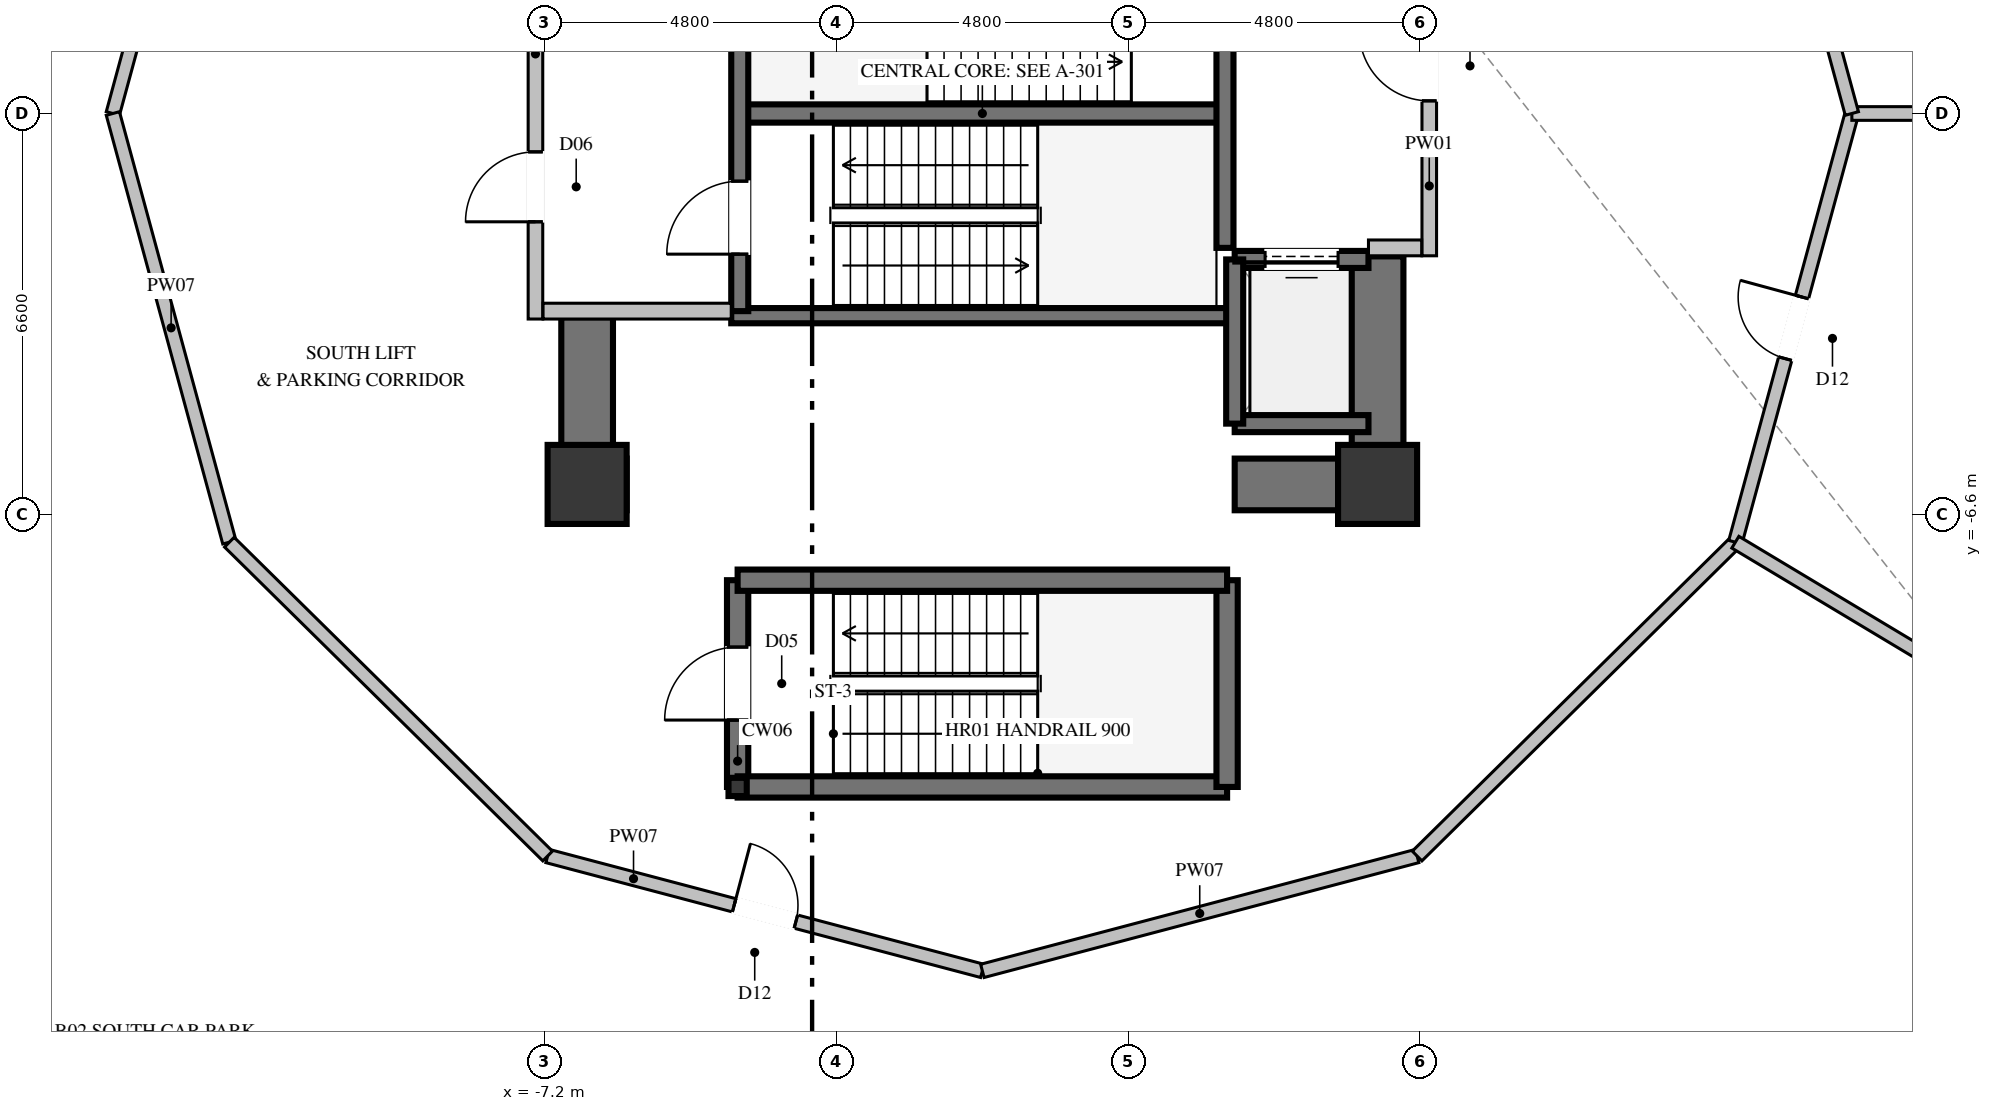
"""IFC4 building model, lengths in metres.
Left out: names, types, materials, properties, quantities, classifications, styles, units other than length and angle.
Written with IfcOpenShell. Run it as: python <this file> out.ifc"""

import sys

from ifc_helpers import new_model, si_unit, direction, frame, frame_2d, origin, origin_2d, place, context, subcontext, project, spatial, rectangle, hollow_rectangle, extrude, element, fill, save


model = new_model("IFC4")
c1 = context("Model", 3, precision=1e-05, world=origin(), true_north=direction((0.0, 1.0)))
c2 = subcontext(c1, "Body", "Model", "MODEL_VIEW")
j1 = project(units=[si_unit("LENGTHUNIT", "METRE"), si_unit("PLANEANGLEUNIT", "RADIAN")], contexts=[c1])
p1 = place(None, origin())
s1 = spatial("IfcSite", under=j1, at=p1, CompositionType="ELEMENT")
p2 = place(p1, origin())
s2 = spatial("IfcBuilding", under=s1, at=p2, CompositionType="ELEMENT")
p3 = place(p2, frame((0.0, 0.0, -9.6)))
s3 = spatial("IfcBuildingStorey", under=s2, at=p3, CompositionType="ELEMENT", Elevation=-9.6)
for number, where, z_axis, x_axis in (
    (1, (-6.5, -6.1, 0.0), (0.0, 0.0, 1.0), (1.0, 0.0, 0.0)),
    (2, (6.5, -6.1, 0.0), (0.0, 0.0, 1.0), (1.0, 0.0, 0.0)),
):
    element("IfcColumn", number, at=place(p3, frame(where, z_axis=z_axis, x_axis=x_axis)), inside=s3, PredefinedType="COLUMN", context=c2, shape_type="SweptSolid", body=[
        extrude(rectangle(XDim=1.3, YDim=1.3, at=origin_2d()), origin(), (0.0, 0.0, 1.0), 4.8),
    ])
p4 = place(p3, frame((-3.99, 0.0, 0.0), z_axis=(0.0, 0.0, 1.0), x_axis=(1.0, 0.0, 0.0)))
e3 = element("IfcWall", 3, at=p4, inside=s3, PredefinedType="SHEAR", context=c2, shape_type="SweptSolid", body=[
    extrude(rectangle(XDim=7.98, YDim=0.3, at=frame_2d((3.99, 0.0))), origin(), (0.0, 0.0, 1.0), 4.8),
])
p5 = place(p3, frame((-4.13, -3.325, 0.0), z_axis=(0.0, 0.0, 1.0), x_axis=(1.0, 0.0, 0.0)))
e4 = element("IfcWall", 4, at=p5, inside=s3, PredefinedType="SOLIDWALL", context=c2, shape_type="SweptSolid", body=[
    extrude(rectangle(XDim=8.26, YDim=0.25, at=frame_2d((4.13, 0.0))), origin(), (0.0, 0.0, 1.0), 4.8),
])
p6 = place(p3, frame((-6.075, -6.1, 0.0), z_axis=(0.0, 0.0, 1.0), x_axis=(1.0, 0.0, 0.0)))
e5 = element("IfcWall", 5, at=p6, inside=s3, PredefinedType="SHEAR", context=c2, shape_type="SweptSolid", body=[
    extrude(rectangle(XDim=0.225, YDim=0.85, at=frame_2d((0.112, 0.0))), origin(), (0.0, 0.0, 1.0), 4.8),
])
p7 = place(p3, frame((4.15, -6.1, 0.0), z_axis=(0.0, 0.0, 1.0), x_axis=(1.0, 0.0, 0.0)))
e6 = element("IfcWall", 6, at=p7, inside=s3, PredefinedType="SHEAR", context=c2, shape_type="SweptSolid", body=[
    extrude(rectangle(XDim=1.925, YDim=0.85, at=frame_2d((0.962, 0.0))), origin(), (0.0, 0.0, 1.0), 4.8),
])
p8 = place(p3, frame((-6.5, -6.525, 0.0), z_axis=(0.0, 0.0, 1.0), x_axis=(0.0, 1.0, 0.0)))
e7 = element("IfcWall", 7, at=p8, inside=s3, PredefinedType="SHEAR", context=c2, shape_type="SweptSolid", body=[
    extrude(rectangle(XDim=3.175, YDim=0.85, at=frame_2d((1.587, 0.0))), origin(), (0.0, 0.0, 1.0), 4.8),
])
p9 = place(p3, frame((6.5, -6.525, 0.0), z_axis=(0.0, 0.0, 1.0), x_axis=(0.0, 1.0, 0.0)))
e8 = element("IfcWall", 8, at=p9, inside=s3, PredefinedType="SHEAR", context=c2, shape_type="SweptSolid", body=[
    extrude(rectangle(XDim=4.175, YDim=0.85, at=frame_2d((2.087, 0.0))), origin(), (0.0, 0.0, 1.0), 4.8),
])
p10 = place(p3, frame((-4.025, -11.075, 0.0), z_axis=(0.0, 0.0, 1.0), x_axis=(1.0, 0.0, 0.0)))
e9 = element("IfcColumn", 9, at=p10, inside=s3, PredefinedType="COLUMN", context=c2, shape_type="SweptSolid", body=[
    extrude(hollow_rectangle(XDim=0.3, YDim=0.3, WallThickness=0.016, at=origin_2d()), origin(), (0.0, 0.0, 1.0), 4.8),
])
p11 = place(p3, frame((4.15, -5.1, 0.0), z_axis=(0.0, 0.0, 1.0), x_axis=(1.0, 0.0, 0.0)))
e10 = element("IfcWall", 10, at=p11, inside=s3, PredefinedType="SOLIDWALL", context=c2, shape_type="SweptSolid", body=[
    extrude(rectangle(XDim=2.2, YDim=0.28, at=frame_2d((1.1, 0.0))), origin(), (0.0, 0.0, 1.0), 4.46),
])
p12 = place(p3, frame((6.35, -2.4, 0.0), z_axis=(0.0, 0.0, 1.0), x_axis=(-1.0, 0.0, 0.0)))
e11 = element("IfcWall", 11, at=p12, inside=s3, PredefinedType="SOLIDWALL", context=c2, shape_type="SweptSolid", body=[
    extrude(rectangle(XDim=2.2, YDim=0.28, at=frame_2d((1.1, 0.0))), origin(), (0.0, 0.0, 1.0), 4.46),
])
p13 = place(p12, frame((0.5, 0.0, 0.0)))
e12 = element("IfcOpeningElement", 12, at=p13, cuts=e11, PredefinedType="OPENING", context=c2, shape_type="SweptSolid", body=[
    extrude(rectangle(XDim=1.2, YDim=2.2, at=frame_2d((0.6, 1.1))), frame((0.0, 0.15, 0.0), z_axis=(0.0, -1.0, 0.0), x_axis=(1.0, 0.0, 0.0)), (0.0, 0.0, 1.0), 0.3),
])
p14 = place(p3, frame((4.15, -2.4, 0.0), z_axis=(0.0, 0.0, 1.0), x_axis=(0.0, -1.0, 0.0)))
e13 = element("IfcWall", 13, at=p14, inside=s3, PredefinedType="SOLIDWALL", context=c2, shape_type="SweptSolid", body=[
    extrude(rectangle(XDim=2.7, YDim=0.28, at=frame_2d((1.35, 0.0))), origin(), (0.0, 0.0, 1.0), 4.46),
])
p15 = place(p3, frame((-3.99, -3.25, 0.0), z_axis=(0.0, 0.0, 1.0), x_axis=(0.0, 1.0, 0.0)))
e14 = element("IfcWall", 14, at=p15, inside=s3, PredefinedType="SOLIDWALL", context=c2, shape_type="SweptSolid", body=[
    extrude(rectangle(XDim=5.46, YDim=0.28, at=frame_2d((2.73, 0.0))), origin(), (0.0, 0.0, 1.0), 4.46),
])
p16 = place(p15, frame((0.937, 0.0, 0.0)))
e15 = element("IfcOpeningElement", 15, at=p16, cuts=e14, PredefinedType="OPENING", context=c2, shape_type="SweptSolid", body=[
    extrude(rectangle(XDim=1.2, YDim=2.2, at=frame_2d((0.6, 1.1))), frame((0.0, 0.15, 0.0), z_axis=(0.0, -1.0, 0.0), x_axis=(1.0, 0.0, 0.0)), (0.0, 0.0, 1.0), 0.3),
])
p17 = place(p3, frame((3.99, -2.21, 0.0), z_axis=(0.0, 0.0, 1.0), x_axis=(0.0, 1.0, 0.0)))
e16 = element("IfcWall", 16, at=p17, inside=s3, PredefinedType="SOLIDWALL", context=c2, shape_type="SweptSolid", body=[
    extrude(rectangle(XDim=5.46, YDim=0.28, at=frame_2d((2.73, 0.0))), origin(), (0.0, 0.0, 1.0), 4.46),
])
p18 = place(p17, frame((3.323, 0.0, 0.0)))
e17 = element("IfcOpeningElement", 17, at=p18, cuts=e16, PredefinedType="OPENING", context=c2, shape_type="SweptSolid", body=[
    extrude(rectangle(XDim=1.2, YDim=2.2, at=frame_2d((0.6, 1.1))), frame((0.0, 0.15, 0.0), z_axis=(0.0, -1.0, 0.0), x_axis=(1.0, 0.0, 0.0)), (0.0, 0.0, 1.0), 0.3),
])
p19 = place(p3, frame((-7.35, -3.38, 0.0), z_axis=(0.0, 0.0, 1.0), x_axis=(0.0, 1.0, 0.0)))
e18 = element("IfcWall", 18, at=p19, inside=s3, PredefinedType="PARTITIONING", context=c2, shape_type="SweptSolid", body=[
    extrude(rectangle(XDim=5.72, YDim=0.24, at=frame_2d((2.86, 0.0))), origin(), (0.0, 0.0, 1.0), 3.345),
])
p20 = place(p19, frame((1.599, 0.0, 0.0)))
e19 = element("IfcOpeningElement", 19, at=p20, cuts=e18, PredefinedType="OPENING", context=c2, shape_type="SweptSolid", body=[
    extrude(rectangle(XDim=1.15, YDim=2.2, at=frame_2d((0.575, 1.1))), frame((0.0, 0.13, 0.0), z_axis=(0.0, -1.0, 0.0), x_axis=(1.0, 0.0, 0.0)), (0.0, 0.0, 1.0), 0.26),
])
p21 = place(p3, frame((-7.225, -3.25, 0.0), z_axis=(0.0, 0.0, 1.0), x_axis=(1.0, 0.0, 0.0)))
e20 = element("IfcWall", 20, at=p21, inside=s3, PredefinedType="PARTITIONING", context=c2, shape_type="SweptSolid", body=[
    extrude(rectangle(XDim=3.095, YDim=0.26, at=frame_2d((1.548, 0.0))), origin(), (0.0, 0.0, 1.0), 4.46),
])
p22 = place(p3, frame((7.35, -2.34, 0.0), z_axis=(0.0, 0.0, 1.0), x_axis=(0.0, 1.0, 0.0)))
e21 = element("IfcWall", 21, at=p22, inside=s3, PredefinedType="PARTITIONING", context=c2, shape_type="SweptSolid", body=[
    extrude(rectangle(XDim=5.07, YDim=0.24, at=frame_2d((2.535, 0.0))), origin(), (0.0, 0.0, 1.0), 3.345),
])
p23 = place(p22, frame((2.548, 0.0, 0.0)))
e22 = element("IfcOpeningElement", 22, at=p23, cuts=e21, PredefinedType="OPENING", context=c2, shape_type="SweptSolid", body=[
    extrude(rectangle(XDim=1.15, YDim=2.2, at=frame_2d((0.575, 1.1))), frame((0.0, 0.13, 0.0), z_axis=(0.0, -1.0, 0.0), x_axis=(1.0, 0.0, 0.0)), (0.0, 0.0, 1.0), 0.26),
])
p24 = place(p3, frame((6.35, -2.21, 0.0), z_axis=(0.0, 0.0, 1.0), x_axis=(1.0, 0.0, 0.0)))
e23 = element("IfcWall", 23, at=p24, inside=s3, PredefinedType="PARTITIONING", context=c2, shape_type="SweptSolid", body=[
    extrude(rectangle(XDim=0.875, YDim=0.26, at=frame_2d((0.438, 0.0))), origin(), (0.0, 0.0, 1.0), 4.46),
])
p25 = place(p3, frame((-4.025, -11.075, 0.0), z_axis=(0.0, 0.0, 1.0), x_axis=(0.0, 1.0, 0.0)))
e24 = element("IfcWall", 24, at=p25, inside=s3, PredefinedType="SOLIDWALL", context=c2, shape_type="SweptSolid", body=[
    extrude(rectangle(XDim=3.4, YDim=0.35, at=frame_2d((1.7, 0.0))), origin(), (0.0, 0.0, 1.0), 4.46),
])
p26 = place(p25, frame((1.1, 0.0, 0.0)))
e25 = element("IfcOpeningElement", 25, at=p26, cuts=e24, PredefinedType="OPENING", context=c2, shape_type="SweptSolid", body=[
    extrude(rectangle(XDim=1.2, YDim=2.2, at=frame_2d((0.6, 1.1))), frame((0.0, 0.185, 0.0), z_axis=(0.0, -1.0, 0.0), x_axis=(1.0, 0.0, 0.0)), (0.0, 0.0, 1.0), 0.37),
])
p27 = place(p3, frame((-4.025, -11.075, 0.0), z_axis=(0.0, 0.0, 1.0), x_axis=(1.0, 0.0, 0.0)))
e26 = element("IfcWall", 26, at=p27, inside=s3, PredefinedType="SOLIDWALL", context=c2, shape_type="SweptSolid", body=[
    extrude(rectangle(XDim=8.05, YDim=0.35, at=frame_2d((4.025, 0.0))), origin(), (0.0, 0.0, 1.0), 4.46),
])
p28 = place(p3, frame((4.025, -11.075, 0.0), z_axis=(0.0, 0.0, 1.0), x_axis=(0.0, 1.0, 0.0)))
e27 = element("IfcWall", 27, at=p28, inside=s3, PredefinedType="SOLIDWALL", context=c2, shape_type="SweptSolid", body=[
    extrude(rectangle(XDim=3.4, YDim=0.35, at=frame_2d((1.7, 0.0))), origin(), (0.0, 0.0, 1.0), 4.46),
])
p29 = place(p3, frame((4.025, -7.675, 0.0), z_axis=(0.0, 0.0, 1.0), x_axis=(-1.0, 0.0, 0.0)))
e28 = element("IfcWall", 28, at=p29, inside=s3, PredefinedType="SOLIDWALL", context=c2, shape_type="SweptSolid", body=[
    extrude(rectangle(XDim=8.05, YDim=0.35, at=frame_2d((4.025, 0.0))), origin(), (0.0, 0.0, 1.0), 4.46),
])
p30 = place(p3, frame((-12.384, 7.05, 0.0), z_axis=(0.0, 0.0, 1.0), x_axis=(-0.262260528785, -0.964997106235, 0.0)))
e29 = element("IfcWall", 29, at=p30, inside=s3, PredefinedType="PARTITIONING", context=c2, shape_type="SweptSolid", body=[
    extrude(rectangle(XDim=7.306, YDim=0.225, at=frame_2d((3.653, 0.0))), origin(), (0.0, 0.0, 1.0), 4.46),
])
p31 = place(p30, frame((3.128, 0.0, 0.0)))
e30 = element("IfcOpeningElement", 30, at=p31, cuts=e29, PredefinedType="OPENING", context=c2, shape_type="SweptSolid", body=[
    extrude(rectangle(XDim=1.05, YDim=2.15, at=frame_2d((0.525, 1.075))), frame((0.0, 0.123, 0.0), z_axis=(0.0, -1.0, 0.0), x_axis=(1.0, 0.0, 0.0)), (0.0, 0.0, 1.0), 0.245),
])
p32 = place(p3, frame((-14.3, 0.0, 0.0), z_axis=(0.0, 0.0, 1.0), x_axis=(0.262260528785, -0.964997106235, 0.0)))
e31 = element("IfcWall", 31, at=p32, inside=s3, PredefinedType="PARTITIONING", context=c2, shape_type="SweptSolid", body=[
    extrude(rectangle(XDim=7.306, YDim=0.225, at=frame_2d((3.653, 0.0))), origin(), (0.0, 0.0, 1.0), 4.46),
])
p33 = place(p3, frame((-7.15, -12.211, 0.0), z_axis=(0.0, 0.0, 1.0), x_axis=(0.966820901533, -0.255455170937, 0.0)))
e32 = element("IfcWall", 32, at=p33, inside=s3, PredefinedType="PARTITIONING", context=c2, shape_type="SweptSolid", body=[
    extrude(rectangle(XDim=7.395, YDim=0.225, at=frame_2d((3.698, 0.0))), origin(), (0.0, 0.0, 1.0), 4.46),
])
p34 = place(p33, frame((3.173, 0.0, 0.0)))
e33 = element("IfcOpeningElement", 33, at=p34, cuts=e32, PredefinedType="OPENING", context=c2, shape_type="SweptSolid", body=[
    extrude(rectangle(XDim=1.05, YDim=2.15, at=frame_2d((0.525, 1.075))), frame((0.0, 0.123, 0.0), z_axis=(0.0, -1.0, 0.0), x_axis=(1.0, 0.0, 0.0)), (0.0, 0.0, 1.0), 0.245),
])
p35 = place(p3, frame((-12.384, -7.05, 0.0), z_axis=(0.0, 0.0, 1.0), x_axis=(0.712071304345, -0.702107155303, 0.0)))
e34 = element("IfcWall", 34, at=p35, inside=s3, PredefinedType="PARTITIONING", context=c2, shape_type="SweptSolid", body=[
    extrude(rectangle(XDim=7.351, YDim=0.225, at=frame_2d((3.675, 0.0))), origin(), (0.0, 0.0, 1.0), 4.46),
])
p36 = place(p3, frame((0.0, -14.1, 0.0), z_axis=(0.0, 0.0, 1.0), x_axis=(0.966820901533, 0.255455170937, 0.0)))
e35 = element("IfcWall", 35, at=p36, inside=s3, PredefinedType="PARTITIONING", context=c2, shape_type="SweptSolid", body=[
    extrude(rectangle(XDim=7.395, YDim=0.225, at=frame_2d((3.698, 0.0))), origin(), (0.0, 0.0, 1.0), 4.46),
])
p37 = place(p3, frame((7.15, -12.211, 0.0), z_axis=(0.0, 0.0, 1.0), x_axis=(0.712071304345, 0.702107155303, 0.0)))
e36 = element("IfcWall", 36, at=p37, inside=s3, PredefinedType="PARTITIONING", context=c2, shape_type="SweptSolid", body=[
    extrude(rectangle(XDim=7.351, YDim=0.225, at=frame_2d((3.675, 0.0))), origin(), (0.0, 0.0, 1.0), 4.46),
])
p38 = place(p3, frame((12.384, -7.05, 0.0), z_axis=(0.0, 0.0, 1.0), x_axis=(0.262260528785, 0.964997106235, 0.0)))
e37 = element("IfcWall", 37, at=p38, inside=s3, PredefinedType="PARTITIONING", context=c2, shape_type="SweptSolid", body=[
    extrude(rectangle(XDim=7.306, YDim=0.225, at=frame_2d((3.653, 0.0))), origin(), (0.0, 0.0, 1.0), 4.46),
])
p39 = place(p38, frame((3.128, 0.0, 0.0)))
e38 = element("IfcOpeningElement", 38, at=p39, cuts=e37, PredefinedType="OPENING", context=c2, shape_type="SweptSolid", body=[
    extrude(rectangle(XDim=1.05, YDim=2.15, at=frame_2d((0.525, 1.075))), frame((0.0, 0.123, 0.0), z_axis=(0.0, -1.0, 0.0), x_axis=(1.0, 0.0, 0.0)), (0.0, 0.0, 1.0), 0.245),
])
p40 = place(p3, frame((18.242, -10.565, 0.0), z_axis=(0.0, 0.0, 1.0), x_axis=(-0.857483465664, 0.514511521846, 0.0)))
e39 = element("IfcWall", 39, at=p40, inside=s3, PredefinedType="PARTITIONING", context=c2, shape_type="SweptSolid", body=[
    extrude(rectangle(XDim=6.832, YDim=0.225, at=frame_2d((3.416, 0.0))), origin(), (0.0, 0.0, 1.0), 3.75),
])
p41 = place(p3, frame((14.3, 0.0, 0.0), z_axis=(0.0, 0.0, 1.0), x_axis=(1.0, 0.0, 0.0)))
e40 = element("IfcWall", 40, at=p41, inside=s3, PredefinedType="PARTITIONING", context=c2, shape_type="SweptSolid", body=[
    extrude(rectangle(XDim=6.0, YDim=0.225, at=frame_2d((3.0, 0.0))), origin(), (0.0, 0.0, 1.0), 3.75),
])
p42 = place(p3, frame((14.3, 0.0, 0.0), z_axis=(0.0, 0.0, 1.0), x_axis=(-0.262260528785, 0.964997106235, 0.0)))
e41 = element("IfcWall", 41, at=p42, inside=s3, PredefinedType="PARTITIONING", context=c2, shape_type="SweptSolid", body=[
    extrude(rectangle(XDim=7.306, YDim=0.225, at=frame_2d((3.653, 0.0))), origin(), (0.0, 0.0, 1.0), 4.46),
])
p43 = place(p42, frame((3.128, 0.0, 0.0)))
e42 = element("IfcOpeningElement", 42, at=p43, cuts=e41, PredefinedType="OPENING", context=c2, shape_type="SweptSolid", body=[
    extrude(rectangle(XDim=1.05, YDim=2.15, at=frame_2d((0.525, 1.075))), frame((0.0, 0.123, 0.0), z_axis=(0.0, -1.0, 0.0), x_axis=(1.0, 0.0, 0.0)), (0.0, 0.0, 1.0), 0.245),
])
p44 = place(p13, origin())
e43 = element("IfcDoor", 43, at=p44, inside=s3, OperationType="SLIDING_TO_LEFT", PredefinedType="DOOR", context=c2, shape_type="SweptSolid", body=[
    extrude(rectangle(XDim=1.2, YDim=2.2, at=frame_2d((0.6, 1.1))), frame((0.0, 0.025, 0.0), z_axis=(0.0, -1.0, 0.0), x_axis=(1.0, 0.0, 0.0)), (0.0, 0.0, 1.0), 0.05),
])
fill(e12, e43)
p45 = place(p16, origin())
e44 = element("IfcDoor", 44, at=p45, inside=s3, OperationType="SINGLE_SWING_LEFT", PredefinedType="DOOR", context=c2, shape_type="SweptSolid", body=[
    extrude(rectangle(XDim=1.2, YDim=2.2, at=frame_2d((0.6, 1.1))), frame((0.0, 0.025, 0.0), z_axis=(0.0, -1.0, 0.0), x_axis=(1.0, 0.0, 0.0)), (0.0, 0.0, 1.0), 0.05),
])
fill(e15, e44)
p46 = place(p20, origin())
e45 = element("IfcDoor", 45, at=p46, inside=s3, OperationType="SINGLE_SWING_LEFT", PredefinedType="DOOR", context=c2, shape_type="SweptSolid", body=[
    extrude(rectangle(XDim=1.15, YDim=2.2, at=frame_2d((0.575, 1.1))), frame((0.0, 0.025, 0.0), z_axis=(0.0, -1.0, 0.0), x_axis=(1.0, 0.0, 0.0)), (0.0, 0.0, 1.0), 0.05),
])
fill(e19, e45)
p47 = place(p23, origin())
e46 = element("IfcDoor", 46, at=p47, inside=s3, OperationType="SINGLE_SWING_RIGHT", PredefinedType="DOOR", context=c2, shape_type="SweptSolid", body=[
    extrude(rectangle(XDim=1.15, YDim=2.2, at=frame_2d((0.575, 1.1))), frame((0.0, 0.025, 0.0), z_axis=(0.0, -1.0, 0.0), x_axis=(1.0, 0.0, 0.0)), (0.0, 0.0, 1.0), 0.05),
])
fill(e22, e46)
p48 = place(p26, origin())
e47 = element("IfcDoor", 47, at=p48, inside=s3, OperationType="SINGLE_SWING_LEFT", PredefinedType="DOOR", context=c2, shape_type="SweptSolid", body=[
    extrude(rectangle(XDim=1.2, YDim=2.2, at=frame_2d((0.6, 1.1))), frame((0.0, 0.025, 0.0), z_axis=(0.0, -1.0, 0.0), x_axis=(1.0, 0.0, 0.0)), (0.0, 0.0, 1.0), 0.05),
])
fill(e25, e47)
p49 = place(p34, origin())
e48 = element("IfcDoor", 48, at=p49, inside=s3, OperationType="SINGLE_SWING_LEFT", PredefinedType="DOOR", context=c2, shape_type="SweptSolid", body=[
    extrude(rectangle(XDim=1.05, YDim=2.15, at=frame_2d((0.525, 1.075))), frame((0.0, 0.025, 0.0), z_axis=(0.0, -1.0, 0.0), x_axis=(1.0, 0.0, 0.0)), (0.0, 0.0, 1.0), 0.05),
])
fill(e33, e48)
p50 = place(p39, origin())
e49 = element("IfcDoor", 49, at=p50, inside=s3, OperationType="SINGLE_SWING_RIGHT", PredefinedType="DOOR", context=c2, shape_type="SweptSolid", body=[
    extrude(rectangle(XDim=1.05, YDim=2.15, at=frame_2d((0.525, 1.075))), frame((0.0, 0.025, 0.0), z_axis=(0.0, -1.0, 0.0), x_axis=(1.0, 0.0, 0.0)), (0.0, 0.0, 1.0), 0.05),
])
fill(e38, e49)
save(model, sys.argv[1])
